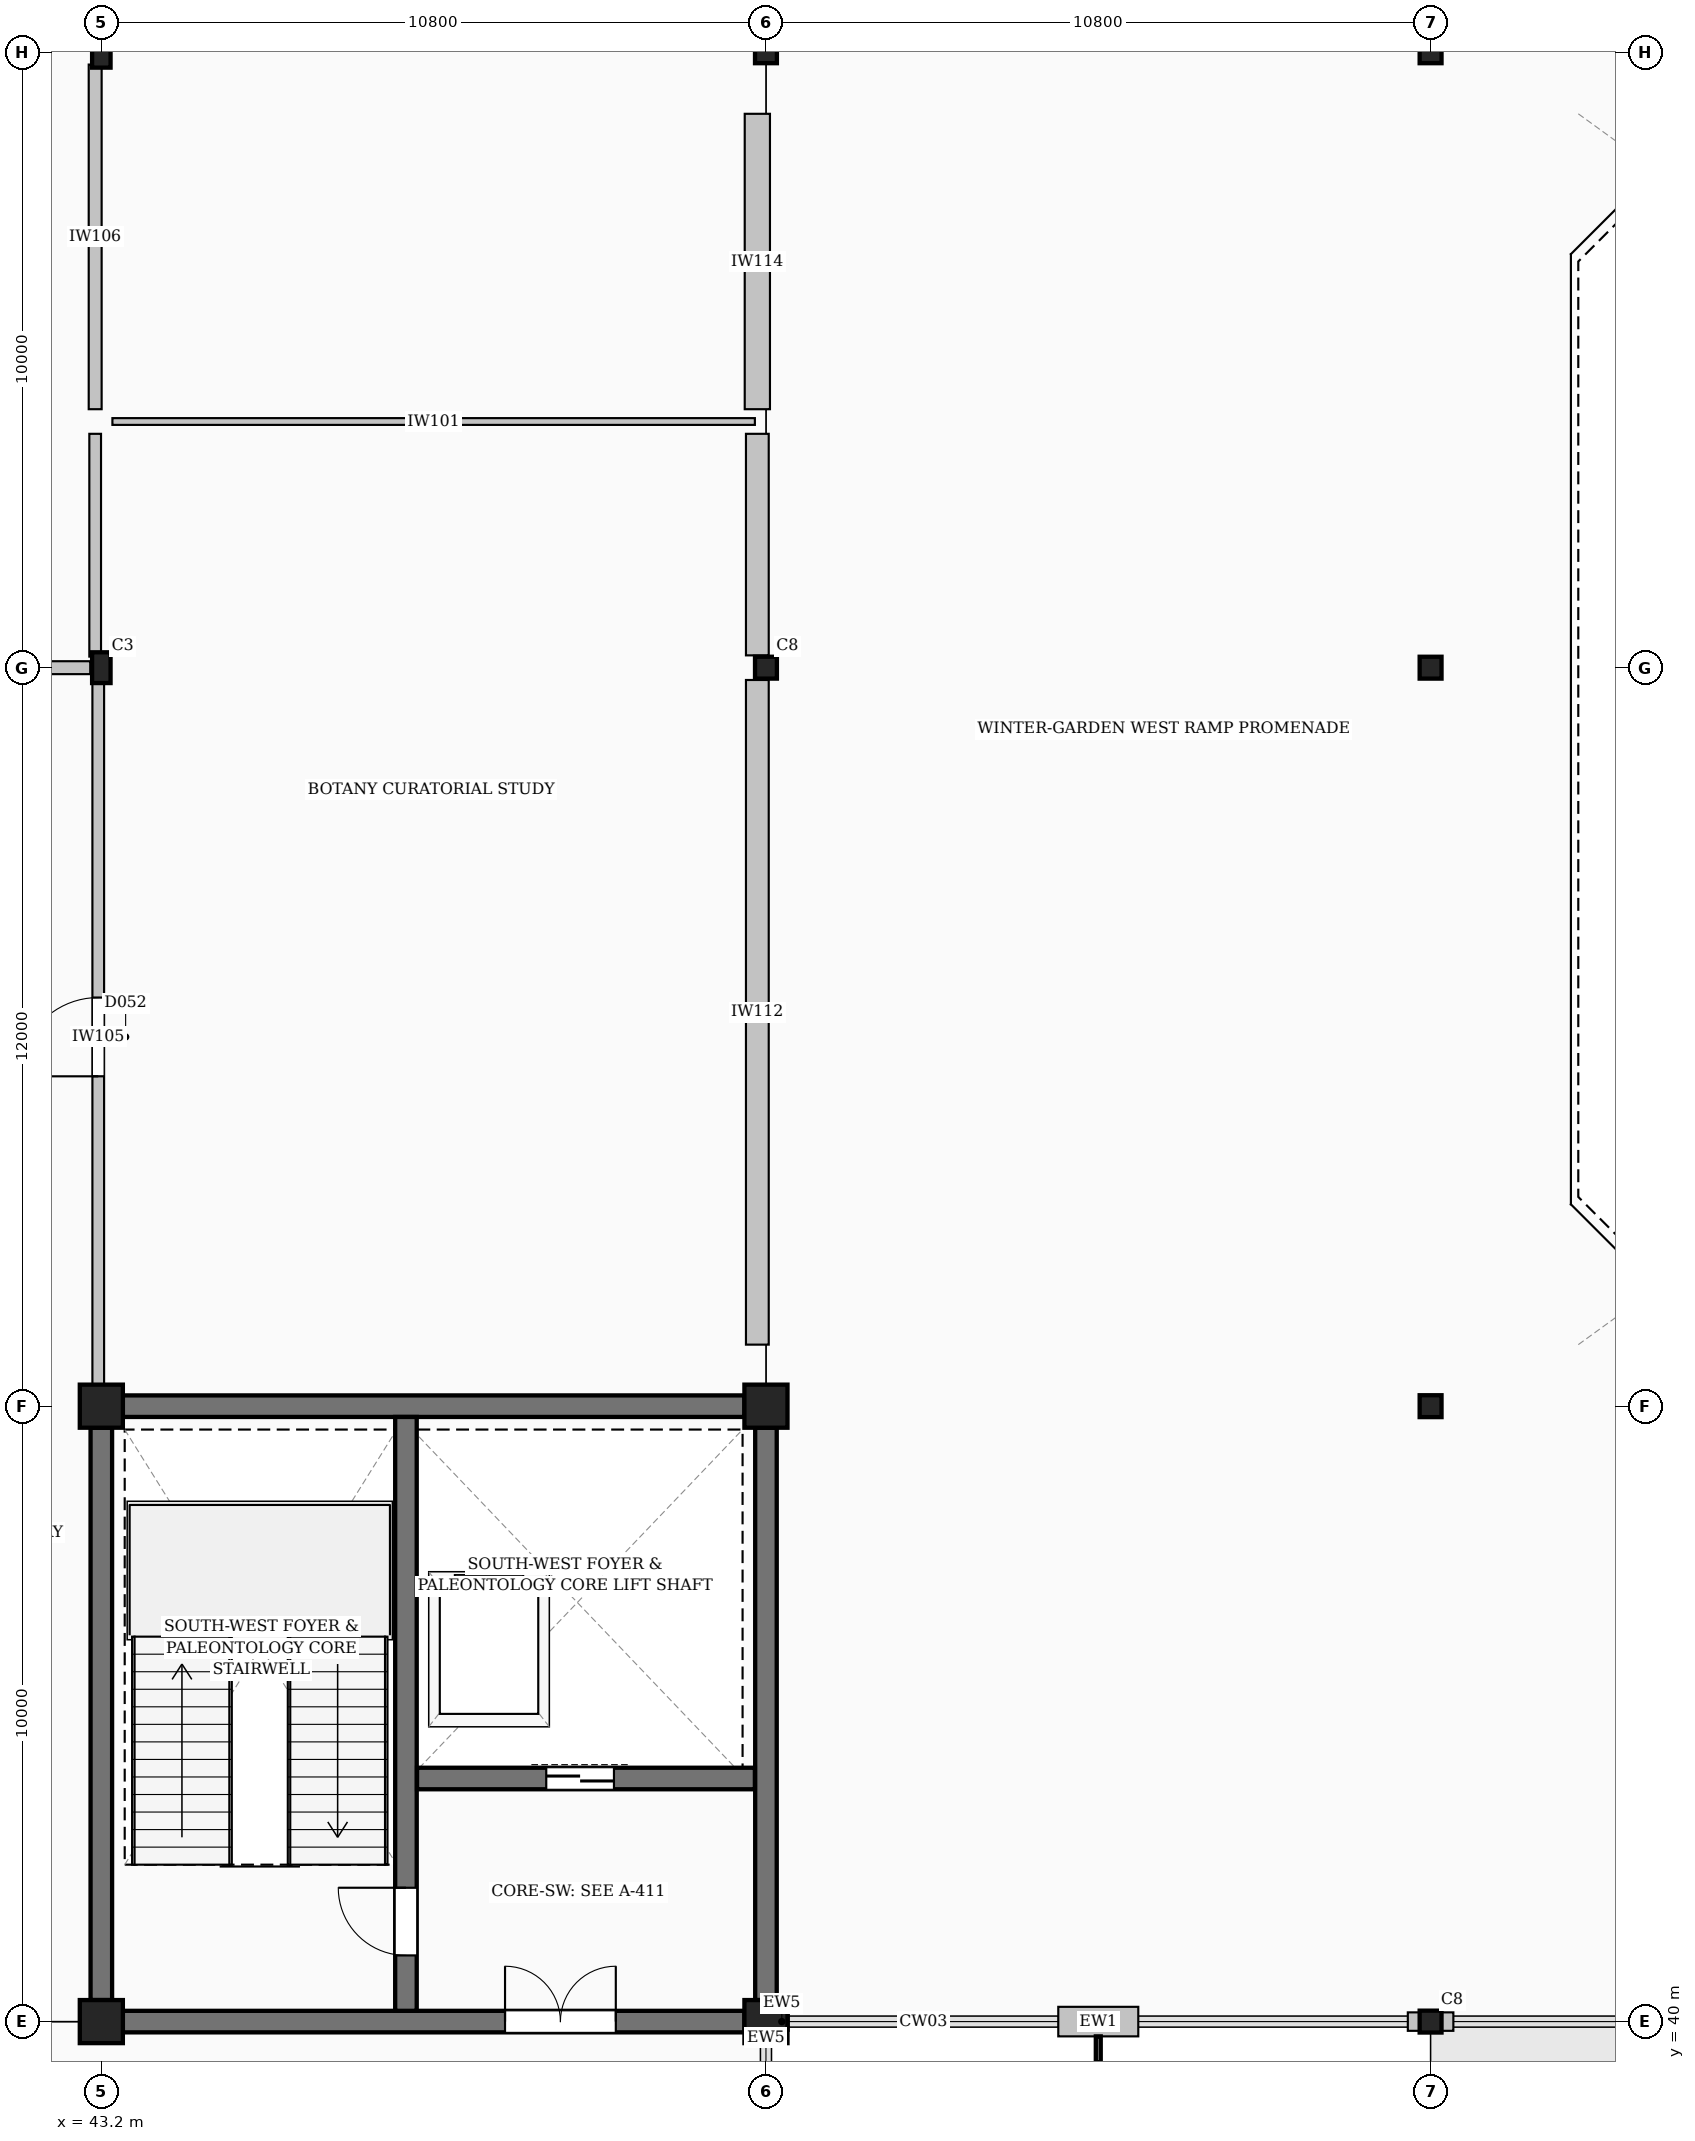
"""IFC4 building model, lengths in metres.
Left out: names, types, materials, properties, quantities, classifications, styles, units other than length and angle.
Written with IfcOpenShell. Run it as: python <this file> out.ifc"""

import sys

from ifc_helpers import new_model, si_unit, direction, frame, frame_2d, origin, origin_2d, place, context, subcontext, project, spatial, rectangle, hollow_circle, i_section, extrude, element, fill, save


model = new_model("IFC4")
c1 = context("Model", 3, precision=1e-05, world=origin(), true_north=direction((0.0, 1.0)))
c2 = subcontext(c1, "Body", "Model", "MODEL_VIEW")
j1 = project(units=[si_unit("LENGTHUNIT", "METRE"), si_unit("PLANEANGLEUNIT", "RADIAN")], contexts=[c1])
p1 = place(None, origin())
s1 = spatial("IfcSite", under=j1, at=p1, CompositionType="ELEMENT")
p2 = place(p1, origin())
s2 = spatial("IfcBuilding", under=s1, at=p2, CompositionType="ELEMENT")
p3 = place(p2, frame((0.0, 0.0, 4.8)))
s3 = spatial("IfcBuildingStorey", under=s2, at=p3, CompositionType="ELEMENT", Elevation=4.8)
for number, where, z_axis, x_axis in (
    (1, (43.2, 40.0, 0.0), (0.0, 0.0, 1.0), (1.0, 0.0, 0.0)),
    (2, (43.2, 50.0, 0.0), (0.0, 0.0, 1.0), (1.0, 0.0, 0.0)),
):
    element("IfcColumn", number, at=place(p3, frame(where, z_axis=z_axis, x_axis=x_axis)), inside=s3, PredefinedType="COLUMN", context=c2, shape_type="SweptSolid", body=[
        extrude(rectangle(XDim=0.7, YDim=0.7, at=origin_2d()), origin(), (0.0, 0.0, 1.0), 4.8),
    ])
for number, where, z_axis, x_axis in (
    (3, (43.2, 62.0, 0.0), (0.0, 0.0, 1.0), (1.0, 0.0, 0.0)),
    (4, (43.2, 72.0, 0.0), (0.0, 0.0, 1.0), (1.0, 0.0, 0.0)),
):
    element("IfcColumn", number, at=place(p3, frame(where, z_axis=z_axis, x_axis=x_axis)), inside=s3, PredefinedType="COLUMN", context=c2, shape_type="SweptSolid", body=[
        extrude(i_section(OverallWidth=0.3, OverallDepth=0.5, WebThickness=0.014, FlangeThickness=0.028, FilletRadius=0.027, at=origin_2d()), origin(), (0.0, 0.0, 1.0), 4.8),
    ])
for number, where, z_axis, x_axis in (
    (5, (54.0, 40.0, 0.0), (0.0, 0.0, 1.0), (1.0, 0.0, 0.0)),
    (6, (54.0, 50.0, 0.0), (0.0, 0.0, 1.0), (1.0, 0.0, 0.0)),
):
    element("IfcColumn", number, at=place(p3, frame(where, z_axis=z_axis, x_axis=x_axis)), inside=s3, PredefinedType="COLUMN", context=c2, shape_type="SweptSolid", body=[
        extrude(rectangle(XDim=0.7, YDim=0.7, at=origin_2d()), origin(), (0.0, 0.0, 1.0), 4.8),
    ])
for number, where, z_axis, x_axis in (
    (7, (54.0, 62.0, 0.0), (0.0, 0.0, 1.0), (1.0, 0.0, 0.0)),
    (8, (54.0, 72.0, 0.0), (0.0, 0.0, 1.0), (1.0, 0.0, 0.0)),
    (9, (64.8, 40.0, 0.0), (0.0, 0.0, 1.0), (1.0, 0.0, 0.0)),
    (10, (64.8, 50.0, 0.0), (0.0, 0.0, 1.0), (1.0, 0.0, 0.0)),
    (11, (64.8, 62.0, 0.0), (0.0, 0.0, 1.0), (1.0, 0.0, 0.0)),
    (12, (64.8, 72.0, 0.0), (0.0, 0.0, 1.0), (1.0, 0.0, 0.0)),
):
    element("IfcColumn", number, at=place(p3, frame(where, z_axis=z_axis, x_axis=x_axis)), inside=s3, PredefinedType="COLUMN", context=c2, shape_type="SweptSolid", body=[
        extrude(hollow_circle(Radius=0.178, WallThickness=0.016, at=origin_2d()), origin(), (0.0, 0.0, 1.0), 4.8),
    ])
p4 = place(p3, frame((54.0, 39.63, 0.0), z_axis=(0.0, 0.0, 1.0), x_axis=(0.0, 1.0, 0.0)))
e13 = element("IfcWall", 13, at=p4, inside=s3, PredefinedType="STANDARD", context=c2, shape_type="SweptSolid", body=[
    extrude(rectangle(XDim=0.225, YDim=0.3, at=frame_2d((0.113, 0.0))), origin(), (0.0, 0.0, 1.0), 4.56),
])
p5 = place(p3, frame((58.75, 40.0, 0.0), z_axis=(0.0, 0.0, 1.0), x_axis=(1.0, 0.0, 0.0)))
e14 = element("IfcWall", 14, at=p5, inside=s3, PredefinedType="STANDARD", context=c2, shape_type="SweptSolid", body=[
    extrude(rectangle(XDim=1.3, YDim=0.48, at=frame_2d((0.65, 0.0))), origin(), (0.0, 0.0, 1.0), 4.06),
])
for number, where, z_axis, x_axis in (
    (15, (54.145, 40.0, 0.0), (0.0, 0.0, 1.0), (1.0, 0.0, 0.0)),
    (16, (64.43, 40.0, 0.0), (0.0, 0.0, 1.0), (1.0, 0.0, 0.0)),
):
    element("IfcWall", number, at=place(p3, frame(where, z_axis=z_axis, x_axis=x_axis)), inside=s3, PredefinedType="STANDARD", context=c2, shape_type="SweptSolid", body=[
        extrude(rectangle(XDim=0.225, YDim=0.3, at=frame_2d((0.113, 0.0))), origin(), (0.0, 0.0, 1.0), 4.56),
    ])
p6 = place(p3, frame((64.945, 40.0, 0.0), z_axis=(0.0, 0.0, 1.0), x_axis=(1.0, 0.0, 0.0)))
e17 = element("IfcWall", 17, at=p6, inside=s3, PredefinedType="STANDARD", context=c2, shape_type="SweptSolid", body=[
    extrude(rectangle(XDim=0.225, YDim=0.3, at=frame_2d((0.112, 0.0))), origin(), (0.0, 0.0, 1.0), 4.56),
])
p7 = place(p3, frame((43.55, 40.0, 0.0), z_axis=(0.0, 0.0, 1.0), x_axis=(1.0, 0.0, 0.0)))
e18 = element("IfcWall", 18, at=p7, inside=s3, PredefinedType="SHEAR", context=c2, shape_type="SweptSolid", body=[
    extrude(rectangle(XDim=10.1, YDim=0.35, at=frame_2d((5.05, 0.0))), origin(), (0.0, 0.0, 1.0), 4.56),
])
p8 = place(p7, frame((6.21, 0.0, 0.0)))
e19 = element("IfcOpeningElement", 19, at=p8, cuts=e18, PredefinedType="OPENING", context=c2, shape_type="SweptSolid", body=[
    extrude(rectangle(XDim=1.8, YDim=2.25, at=frame_2d((0.9, 1.125))), frame((0.0, 0.185, 0.0), z_axis=(0.0, -1.0, 0.0), x_axis=(1.0, 0.0, 0.0)), (0.0, 0.0, 1.0), 0.37),
])
p9 = place(p3, frame((43.55, 50.0, 0.0), z_axis=(0.0, 0.0, 1.0), x_axis=(1.0, 0.0, 0.0)))
e20 = element("IfcWall", 20, at=p9, inside=s3, PredefinedType="SHEAR", context=c2, shape_type="SweptSolid", body=[
    extrude(rectangle(XDim=10.1, YDim=0.35, at=frame_2d((5.05, 0.0))), origin(), (0.0, 0.0, 1.0), 4.56),
])
for number, where, z_axis, x_axis in (
    (21, (43.2, 40.35, 0.0), (0.0, 0.0, 1.0), (0.0, 1.0, 0.0)),
    (22, (54.0, 40.35, 0.0), (0.0, 0.0, 1.0), (0.0, 1.0, 0.0)),
):
    element("IfcWall", number, at=place(p3, frame(where, z_axis=z_axis, x_axis=x_axis)), inside=s3, PredefinedType="SHEAR", context=c2, shape_type="SweptSolid", body=[
        extrude(rectangle(XDim=9.3, YDim=0.35, at=frame_2d((4.65, 0.0))), origin(), (0.0, 0.0, 1.0), 4.56),
    ])
p10 = place(p3, frame((48.15, 40.175, 0.0), z_axis=(0.0, 0.0, 1.0), x_axis=(0.0, 1.0, 0.0)))
e23 = element("IfcWall", 23, at=p10, inside=s3, PredefinedType="SHEAR", context=c2, shape_type="SweptSolid", body=[
    extrude(rectangle(XDim=9.65, YDim=0.35, at=frame_2d((4.825, 0.0))), origin(), (0.0, 0.0, 1.0), 4.56),
])
p11 = place(p10, frame((0.9, 0.0, 0.0)))
e24 = element("IfcOpeningElement", 24, at=p11, cuts=e23, PredefinedType="OPENING", context=c2, shape_type="SweptSolid", body=[
    extrude(rectangle(XDim=1.1, YDim=2.2, at=frame_2d((0.55, 1.1))), frame((0.0, 0.185, 0.0), z_axis=(0.0, -1.0, 0.0), x_axis=(1.0, 0.0, 0.0)), (0.0, 0.0, 1.0), 0.37),
])
p12 = place(p3, frame((48.33, 43.95, 0.0), z_axis=(0.0, 0.0, 1.0), x_axis=(1.0, 0.0, 0.0)))
e25 = element("IfcWall", 25, at=p12, inside=s3, PredefinedType="SHEAR", context=c2, shape_type="SweptSolid", body=[
    extrude(rectangle(XDim=5.49, YDim=0.35, at=frame_2d((2.745, 0.0))), origin(), (0.0, 0.0, 1.0), 4.56),
])
p13 = place(p12, frame((2.1, 0.0, 0.0)))
e26 = element("IfcOpeningElement", 26, at=p13, cuts=e25, PredefinedType="OPENING", context=c2, shape_type="SweptSolid", body=[
    extrude(rectangle(XDim=1.1, YDim=2.2, at=frame_2d((0.55, 1.1))), frame((0.0, 0.185, 0.0), z_axis=(0.0, -1.0, 0.0), x_axis=(1.0, 0.0, 0.0)), (0.0, 0.0, 1.0), 0.37),
])
p14 = place(p3, frame((38.2, 62.0, 0.0), z_axis=(0.0, 0.0, 1.0), x_axis=(1.0, 0.0, 0.0)))
e27 = element("IfcWall", 27, at=p14, inside=s3, PredefinedType="PARTITIONING", context=c2, shape_type="SweptSolid", body=[
    extrude(rectangle(XDim=4.82, YDim=0.21, at=frame_2d((2.41, 0.0))), origin(), (0.0, 0.0, 1.0), 4.049),
])
p15 = place(p14, frame((1.435, 0.0, 0.0)))
e28 = element("IfcOpeningElement", 28, at=p15, cuts=e27, PredefinedType="OPENING", context=c2, shape_type="SweptSolid", body=[
    extrude(rectangle(XDim=1.95, YDim=2.5, at=frame_2d((0.975, 1.25))), frame((0.0, 0.115, 0.0), z_axis=(0.0, -1.0, 0.0), x_axis=(1.0, 0.0, 0.0)), (0.0, 0.0, 1.0), 0.23),
])
p16 = place(p3, frame((43.15, 50.18, 0.0), z_axis=(0.0, 0.0, 1.0), x_axis=(0.0, 1.0, 0.0)))
e29 = element("IfcWall", 29, at=p16, inside=s3, PredefinedType="PARTITIONING", context=c2, shape_type="SweptSolid", body=[
    extrude(rectangle(XDim=11.64, YDim=0.19, at=frame_2d((5.82, 0.0))), origin(), (0.0, 0.0, 1.0), 3.939),
])
p17 = place(p16, frame((5.18, 0.0, 0.0)))
e30 = element("IfcOpeningElement", 30, at=p17, cuts=e29, PredefinedType="OPENING", context=c2, shape_type="SweptSolid", body=[
    extrude(rectangle(XDim=1.28, YDim=2.32, at=frame_2d((0.64, 1.16))), frame((0.0, 0.105, 0.0), z_axis=(0.0, -1.0, 0.0), x_axis=(1.0, 0.0, 0.0)), (0.0, 0.0, 1.0), 0.21),
])
p18 = place(p3, frame((43.38, 66.0, 0.0), z_axis=(0.0, 0.0, 1.0), x_axis=(1.0, 0.0, 0.0)))
e31 = element("IfcWall", 31, at=p18, inside=s3, PredefinedType="PARTITIONING", context=c2, shape_type="SweptSolid", body=[
    extrude(rectangle(XDim=10.44, YDim=0.11, at=frame_2d((5.22, 0.0))), origin(), (0.0, 0.0, 1.0), 4.52),
])
p19 = place(p3, frame((43.1, 62.18, 0.0), z_axis=(0.0, 0.0, 1.0), x_axis=(0.0, 1.0, 0.0)))
e32 = element("IfcWall", 32, at=p19, inside=s3, PredefinedType="PARTITIONING", context=c2, shape_type="SweptSolid", body=[
    extrude(rectangle(XDim=3.62, YDim=0.19, at=frame_2d((1.81, 0.0))), origin(), (0.0, 0.0, 1.0), 4.04),
])
p20 = place(p3, frame((43.1, 66.2, 0.0), z_axis=(0.0, 0.0, 1.0), x_axis=(0.0, 1.0, 0.0)))
e33 = element("IfcWall", 33, at=p20, inside=s3, PredefinedType="PARTITIONING", context=c2, shape_type="SweptSolid", body=[
    extrude(rectangle(XDim=5.6, YDim=0.21, at=frame_2d((2.8, 0.0))), origin(), (0.0, 0.0, 1.0), 4.04),
])
p21 = place(p3, frame((53.86, 51.0, 0.0), z_axis=(0.0, 0.0, 1.0), x_axis=(0.0, 1.0, 0.0)))
e34 = element("IfcWall", 34, at=p21, inside=s3, PredefinedType="PARTITIONING", context=c2, shape_type="SweptSolid", body=[
    extrude(rectangle(XDim=10.8, YDim=0.37, at=frame_2d((5.4, 0.0))), origin(), (0.0, 0.0, 1.0), 4.52),
])
p22 = place(p3, frame((53.86, 62.2, 0.0), z_axis=(0.0, 0.0, 1.0), x_axis=(0.0, 1.0, 0.0)))
e35 = element("IfcWall", 35, at=p22, inside=s3, PredefinedType="PARTITIONING", context=c2, shape_type="SweptSolid", body=[
    extrude(rectangle(XDim=3.6, YDim=0.37, at=frame_2d((1.8, 0.0))), origin(), (0.0, 0.0, 1.0), 4.52),
])
p23 = place(p3, frame((53.86, 66.2, 0.0), z_axis=(0.0, 0.0, 1.0), x_axis=(0.0, 1.0, 0.0)))
e36 = element("IfcWall", 36, at=p23, inside=s3, PredefinedType="PARTITIONING", context=c2, shape_type="SweptSolid", body=[
    extrude(rectangle(XDim=4.8, YDim=0.41, at=frame_2d((2.4, 0.0))), origin(), (0.0, 0.0, 1.0), 4.52),
])
p24 = place(p11, origin())
e37 = element("IfcDoor", 37, at=p24, inside=s3, OperationType="SINGLE_SWING_RIGHT", PredefinedType="DOOR", context=c2, shape_type="SweptSolid", body=[
    extrude(rectangle(XDim=1.1, YDim=2.2, at=frame_2d((0.55, 1.1))), frame((0.0, 0.025, 0.0), z_axis=(0.0, -1.0, 0.0), x_axis=(1.0, 0.0, 0.0)), (0.0, 0.0, 1.0), 0.05),
])
fill(e24, e37)
p25 = place(p8, origin())
e38 = element("IfcDoor", 38, at=p25, inside=s3, OperationType="DOUBLE_DOOR_SINGLE_SWING", PredefinedType="DOOR", context=c2, shape_type="SweptSolid", body=[
    extrude(rectangle(XDim=1.8, YDim=2.25, at=frame_2d((0.9, 1.125))), frame((0.0, 0.025, 0.0), z_axis=(0.0, -1.0, 0.0), x_axis=(1.0, 0.0, 0.0)), (0.0, 0.0, 1.0), 0.05),
])
fill(e19, e38)
p26 = place(p13, origin())
e39 = element("IfcDoor", 39, at=p26, inside=s3, OperationType="DOUBLE_DOOR_SLIDING", PredefinedType="DOOR", context=c2, shape_type="SweptSolid", body=[
    extrude(rectangle(XDim=1.1, YDim=2.2, at=frame_2d((0.55, 1.1))), frame((0.0, 0.025, 0.0), z_axis=(0.0, -1.0, 0.0), x_axis=(1.0, 0.0, 0.0)), (0.0, 0.0, 1.0), 0.05),
])
fill(e26, e39)
p27 = place(p17, origin())
e40 = element("IfcDoor", 40, at=p27, inside=s3, OperationType="SINGLE_SWING_LEFT", PredefinedType="DOOR", context=c2, shape_type="SweptSolid", body=[
    extrude(rectangle(XDim=1.28, YDim=2.32, at=frame_2d((0.64, 1.16))), frame((0.0, 0.025, 0.0), z_axis=(0.0, -1.0, 0.0), x_axis=(1.0, 0.0, 0.0)), (0.0, 0.0, 1.0), 0.05),
])
fill(e30, e40)
save(model, sys.argv[1])
